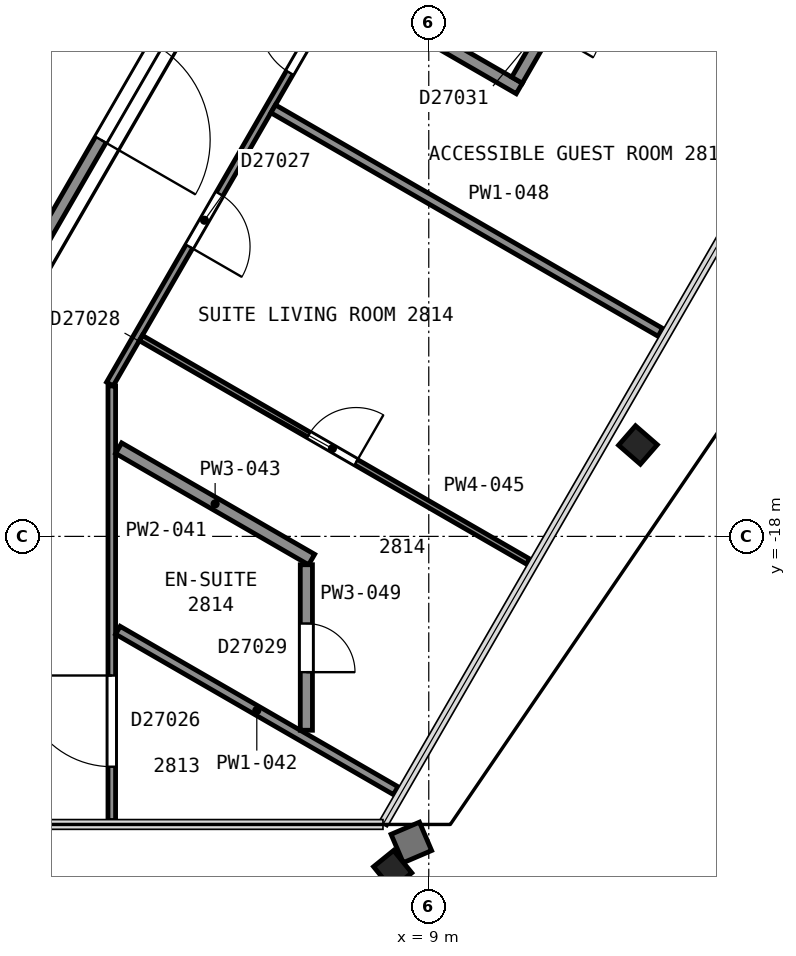
"""IFC4 building model, lengths in metres.
Left out: names, types, materials, properties, quantities, classifications, styles, units other than length and angle.
Written with IfcOpenShell. Run it as: python <this file> out.ifc"""

import sys

from ifc_helpers import new_model, si_unit, direction, frame, frame_2d, origin, origin_2d, place, context, subcontext, project, spatial, rectangle, i_section, extrude, element, fill, save


model = new_model("IFC4")
c1 = context("Model", 3, precision=1e-05, world=origin(), true_north=direction((0.0, 1.0)))
c2 = subcontext(c1, "Body", "Model", "MODEL_VIEW")
j1 = project(units=[si_unit("LENGTHUNIT", "METRE"), si_unit("PLANEANGLEUNIT", "RADIAN")], contexts=[c1])
p1 = place(None, origin())
s1 = spatial("IfcSite", under=j1, at=p1, CompositionType="ELEMENT")
p2 = place(p1, origin())
s2 = spatial("IfcBuilding", under=s1, at=p2, CompositionType="ELEMENT")
p3 = place(p2, frame((0.0, 0.0, 118.0)))
s3 = spatial("IfcBuildingStorey", under=s2, at=p3, CompositionType="ELEMENT", Elevation=118.0)
p4 = place(p3, frame((8.256, -23.297, 0.045), z_axis=(0.127835131108, -0.157801810749, 0.979161257291), x_axis=(-0.498757070895, -0.863572127983, -0.07405784228)))
e1 = element("IfcColumn", 1, at=p4, inside=s3, PredefinedType="COLUMN", context=c2, shape_type="SweptSolid", body=[
    extrude(i_section(OverallWidth=0.424, OverallDepth=0.475, WebThickness=0.048, FlangeThickness=0.077, FilletRadius=0.015, at=origin_2d()), origin(), (0.0, 0.0, 1.0), 3.585),
])
p5 = place(p3, frame((12.266, -16.345, 0.04), z_axis=(0.147073165168, -0.128025761723, 0.980805224508), x_axis=(-0.499695288695, -0.865366131575, -0.038027316234)))
e2 = element("IfcColumn", 2, at=p5, inside=s3, PredefinedType="COLUMN", context=c2, shape_type="SweptSolid", body=[
    extrude(i_section(OverallWidth=0.424, OverallDepth=0.475, WebThickness=0.048, FlangeThickness=0.077, FilletRadius=0.015, at=origin_2d()), origin(), (0.0, 0.0, 1.0), 3.589),
])
p6 = place(p3, frame((1.677, -14.815, 0.0), z_axis=(0.0, 0.0, 1.0), x_axis=(0.49999445743, 0.866028603765, 0.0)))
e3 = element("IfcWall", 3, at=p6, inside=s3, PredefinedType="PARTITIONING", context=c2, shape_type="SweptSolid", body=[
    extrude(rectangle(XDim=5.905, YDim=0.2, at=frame_2d((2.952, 0.0))), origin(), (0.0, 0.0, 1.0), 3.35),
])
p7 = place(p6, frame((3.855, 0.0, 0.0)))
e4 = element("IfcOpeningElement", 4, at=p7, cuts=e3, PredefinedType="OPENING", context=c2, shape_type="SweptSolid", body=[
    extrude(rectangle(XDim=1.8, YDim=2.1, at=frame_2d((0.9, 1.05))), frame((0.0, 0.11, 0.0), z_axis=(0.0, -1.0, 0.0), x_axis=(1.0, 0.0, 0.0)), (0.0, 0.0, 1.0), 0.22),
])
p8 = place(p3, frame((3.787, -15.525, 0.0), z_axis=(0.0, 0.0, 1.0), x_axis=(0.0, -1.0, 0.0)))
e5 = element("IfcWall", 5, at=p8, inside=s3, PredefinedType="PARTITIONING", context=c2, shape_type="SweptSolid", body=[
    extrude(rectangle(XDim=7.148, YDim=0.125, at=frame_2d((3.574, 0.0))), origin(), (0.0, 0.0, 1.0), 2.613),
])
p9 = place(p8, frame((4.763, 0.0, 0.0)))
e6 = element("IfcOpeningElement", 6, at=p9, cuts=e5, PredefinedType="OPENING", context=c2, shape_type="SweptSolid", body=[
    extrude(rectangle(XDim=1.5, YDim=2.1, at=frame_2d((0.75, 1.05))), frame((0.0, 0.073, 0.0), z_axis=(0.0, -1.0, 0.0), x_axis=(1.0, 0.0, 0.0)), (0.0, 0.0, 1.0), 0.145),
])
p10 = place(p3, frame((3.887, -19.544, 0.0), z_axis=(0.0, 0.0, 1.0), x_axis=(0.866042279195, -0.499970769793, 0.0)))
e7 = element("IfcWall", 7, at=p10, inside=s3, PredefinedType="PARTITIONING", context=c2, shape_type="SweptSolid", body=[
    extrude(rectangle(XDim=5.277, YDim=0.15, at=frame_2d((2.638, 0.0))), origin(), (0.0, 0.0, 1.0), 2.613),
])
p11 = place(p3, frame((3.899, -16.549, 0.0), z_axis=(0.0, 0.0, 1.0), x_axis=(0.866074669803, -0.499914659043, 0.0)))
e8 = element("IfcWall", 8, at=p11, inside=s3, PredefinedType="PARTITIONING", context=c2, shape_type="SweptSolid", body=[
    extrude(rectangle(XDim=3.665, YDim=0.2, at=frame_2d((1.833, 0.0))), origin(), (0.0, 0.0, 1.0), 2.613),
])
p12 = place(p3, frame((15.684, 5.165, 0.0), z_axis=(0.0, 0.0, 1.0), x_axis=(-0.500027787016, -0.866009360349, 0.0)))
e9 = element("IfcWall", 9, at=p12, inside=s3, PredefinedType="PARTITIONING", context=c2, shape_type="SweptSolid", body=[
    extrude(rectangle(XDim=23.856, YDim=0.125, at=frame_2d((11.928, 0.0))), origin(), (0.0, 0.0, 1.0), 2.613),
])
p13 = place(p12, frame((20.245, 0.0, 0.0)))
e10 = element("IfcOpeningElement", 10, at=p13, cuts=e9, PredefinedType="OPENING", context=c2, shape_type="SweptSolid", body=[
    extrude(rectangle(XDim=1.0, YDim=2.1, at=frame_2d((0.5, 1.05))), frame((0.0, 0.073, 0.0), z_axis=(0.0, -1.0, 0.0), x_axis=(1.0, 0.0, 0.0)), (0.0, 0.0, 1.0), 0.145),
])
p14 = place(p12, frame((16.943, 0.0, 0.0)))
e11 = element("IfcOpeningElement", 11, at=p14, cuts=e9, PredefinedType="OPENING", context=c2, shape_type="SweptSolid", body=[
    extrude(rectangle(XDim=1.0, YDim=2.1, at=frame_2d((0.5, 1.05))), frame((0.0, 0.073, 0.0), z_axis=(0.0, -1.0, 0.0), x_axis=(1.0, 0.0, 0.0)), (0.0, 0.0, 1.0), 0.145),
])
p15 = place(p12, frame((6.227, 0.0, 0.0)))
e12 = element("IfcOpeningElement", 12, at=p15, cuts=e9, PredefinedType="OPENING", context=c2, shape_type="SweptSolid", body=[
    extrude(rectangle(XDim=1.0, YDim=2.1, at=frame_2d((0.5, 1.05))), frame((0.0, 0.073, 0.0), z_axis=(0.0, -1.0, 0.0), x_axis=(1.0, 0.0, 0.0)), (0.0, 0.0, 1.0), 0.145),
])
p16 = place(p12, frame((2.825, 0.0, 0.0)))
e13 = element("IfcOpeningElement", 13, at=p16, cuts=e9, PredefinedType="OPENING", context=c2, shape_type="SweptSolid", body=[
    extrude(rectangle(XDim=0.9, YDim=2.1, at=frame_2d((0.45, 1.05))), frame((0.0, 0.073, 0.0), z_axis=(0.0, -1.0, 0.0), x_axis=(1.0, 0.0, 0.0)), (0.0, 0.0, 1.0), 0.145),
])
p17 = place(p3, frame((10.633, -18.413, 0.0), z_axis=(0.0, 0.0, 1.0), x_axis=(-0.8660606245, 0.499938990969, 0.0)))
e14 = element("IfcWall", 14, at=p17, inside=s3, PredefinedType="PARTITIONING", context=c2, shape_type="SweptSolid", body=[
    extrude(rectangle(XDim=7.353, YDim=0.1, at=frame_2d((3.676, 0.0))), origin(), (0.0, 0.0, 1.0), 2.613),
])
p18 = place(p17, frame((3.265, 0.0, 0.0)))
e15 = element("IfcOpeningElement", 15, at=p18, cuts=e14, PredefinedType="OPENING", context=c2, shape_type="SweptSolid", body=[
    extrude(rectangle(XDim=0.9, YDim=2.1, at=frame_2d((0.45, 1.05))), frame((0.0, 0.06, 0.0), z_axis=(0.0, -1.0, 0.0), x_axis=(1.0, 0.0, 0.0)), (0.0, 0.0, 1.0), 0.12),
])
p19 = place(p3, frame((6.441, -10.968, 0.0), z_axis=(0.0, 0.0, 1.0), x_axis=(0.8660606245, -0.499938990969, 0.0)))
e16 = element("IfcWall", 16, at=p19, inside=s3, PredefinedType="PARTITIONING", context=c2, shape_type="SweptSolid", body=[
    extrude(rectangle(XDim=7.353, YDim=0.15, at=frame_2d((3.676, 0.0))), origin(), (0.0, 0.0, 1.0), 2.613),
])
p20 = place(p3, frame((6.987, -21.189, 0.0), z_axis=(0.0, 0.0, 1.0), x_axis=(0.0, 1.0, 0.0)))
e17 = element("IfcWall", 17, at=p20, inside=s3, PredefinedType="PARTITIONING", context=c2, shape_type="SweptSolid", body=[
    extrude(rectangle(XDim=2.723, YDim=0.2, at=frame_2d((1.361, 0.0))), origin(), (0.0, 0.0, 1.0), 2.613),
])
p21 = place(p20, frame((0.956, 0.0, 0.0)))
e18 = element("IfcOpeningElement", 18, at=p21, cuts=e17, PredefinedType="OPENING", context=c2, shape_type="SweptSolid", body=[
    extrude(rectangle(XDim=0.8, YDim=2.1, at=frame_2d((0.4, 1.05))), frame((0.0, 0.11, 0.0), z_axis=(0.0, -1.0, 0.0), x_axis=(1.0, 0.0, 0.0)), (0.0, 0.0, 1.0), 0.22),
])
p22 = place(p3, frame((7.603, -8.967, 0.0), z_axis=(0.0, 0.0, 1.0), x_axis=(0.866020884234, -0.500007828009, 0.0)))
e19 = element("IfcWall", 19, at=p22, inside=s3, PredefinedType="PARTITIONING", context=c2, shape_type="SweptSolid", body=[
    extrude(rectangle(XDim=3.333, YDim=0.2, at=frame_2d((1.666, 0.0))), origin(), (0.0, 0.0, 1.0), 2.613),
])
p23 = place(p3, frame((9.103, -6.369, 0.0), z_axis=(0.0, 0.0, 1.0), x_axis=(0.866055004685, -0.499948726231, 0.0)))
e20 = element("IfcWall", 20, at=p23, inside=s3, PredefinedType="PARTITIONING", context=c2, shape_type="SweptSolid", body=[
    extrude(rectangle(XDim=7.347, YDim=0.15, at=frame_2d((3.674, 0.0))), origin(), (0.0, 0.0, 1.0), 2.613),
])
p24 = place(p3, frame((10.452, -10.496, 0.0), z_axis=(0.0, 0.0, 1.0), x_axis=(0.500061596976, 0.865989837833, 0.0)))
e21 = element("IfcWall", 21, at=p24, inside=s3, PredefinedType="PARTITIONING", context=c2, shape_type="SweptSolid", body=[
    extrude(rectangle(XDim=2.825, YDim=0.2, at=frame_2d((1.413, 0.0))), origin(), (0.0, 0.0, 1.0), 2.613),
])
p25 = place(p24, frame((0.95, 0.0, 0.0)))
e22 = element("IfcOpeningElement", 22, at=p25, cuts=e21, PredefinedType="OPENING", context=c2, shape_type="SweptSolid", body=[
    extrude(rectangle(XDim=0.9, YDim=2.1, at=frame_2d((0.45, 1.05))), frame((0.0, 0.11, 0.0), z_axis=(0.0, -1.0, 0.0), x_axis=(1.0, 0.0, 0.0)), (0.0, 0.0, 1.0), 0.22),
])
p26 = place(p7, origin())
e23 = element("IfcDoor", 23, at=p26, inside=s3, OperationType="DOUBLE_DOOR_SINGLE_SWING", PredefinedType="DOOR", context=c2, shape_type="SweptSolid", body=[
    extrude(rectangle(XDim=1.8, YDim=2.1, at=frame_2d((0.9, 1.05))), frame((0.0, 0.025, 0.0), z_axis=(0.0, -1.0, 0.0), x_axis=(1.0, 0.0, 0.0)), (0.0, 0.0, 1.0), 0.05),
])
fill(e4, e23)
p27 = place(p9, origin())
e24 = element("IfcDoor", 24, at=p27, inside=s3, OperationType="DOUBLE_DOOR_SINGLE_SWING", PredefinedType="DOOR", context=c2, shape_type="SweptSolid", body=[
    extrude(rectangle(XDim=1.5, YDim=2.1, at=frame_2d((0.75, 1.05))), frame((0.0, 0.025, 0.0), z_axis=(0.0, -1.0, 0.0), x_axis=(1.0, 0.0, 0.0)), (0.0, 0.0, 1.0), 0.05),
])
fill(e6, e24)
p28 = place(p13, origin())
e25 = element("IfcDoor", 25, at=p28, inside=s3, OperationType="SINGLE_SWING_RIGHT", PredefinedType="DOOR", context=c2, shape_type="SweptSolid", body=[
    extrude(rectangle(XDim=1.0, YDim=2.1, at=frame_2d((0.5, 1.05))), frame((0.0, 0.025, 0.0), z_axis=(0.0, -1.0, 0.0), x_axis=(1.0, 0.0, 0.0)), (0.0, 0.0, 1.0), 0.05),
])
fill(e10, e25)
p29 = place(p14, origin())
e26 = element("IfcDoor", 26, at=p29, inside=s3, OperationType="SINGLE_SWING_LEFT", PredefinedType="DOOR", context=c2, shape_type="SweptSolid", body=[
    extrude(rectangle(XDim=1.0, YDim=2.1, at=frame_2d((0.5, 1.05))), frame((0.0, 0.025, 0.0), z_axis=(0.0, -1.0, 0.0), x_axis=(1.0, 0.0, 0.0)), (0.0, 0.0, 1.0), 0.05),
])
fill(e11, e26)
p30 = place(p18, origin())
e27 = element("IfcDoor", 27, at=p30, inside=s3, OperationType="SINGLE_SWING_LEFT", PredefinedType="DOOR", context=c2, shape_type="SweptSolid", body=[
    extrude(rectangle(XDim=0.9, YDim=2.1, at=frame_2d((0.45, 1.05))), frame((0.0, 0.025, 0.0), z_axis=(0.0, -1.0, 0.0), x_axis=(1.0, 0.0, 0.0)), (0.0, 0.0, 1.0), 0.05),
])
fill(e15, e27)
p31 = place(p21, origin())
e28 = element("IfcDoor", 28, at=p31, inside=s3, OperationType="SINGLE_SWING_LEFT", PredefinedType="DOOR", context=c2, shape_type="SweptSolid", body=[
    extrude(rectangle(XDim=0.8, YDim=2.1, at=frame_2d((0.4, 1.05))), frame((0.0, 0.025, 0.0), z_axis=(0.0, -1.0, 0.0), x_axis=(1.0, 0.0, 0.0)), (0.0, 0.0, 1.0), 0.05),
])
fill(e18, e28)
save(model, sys.argv[1])
